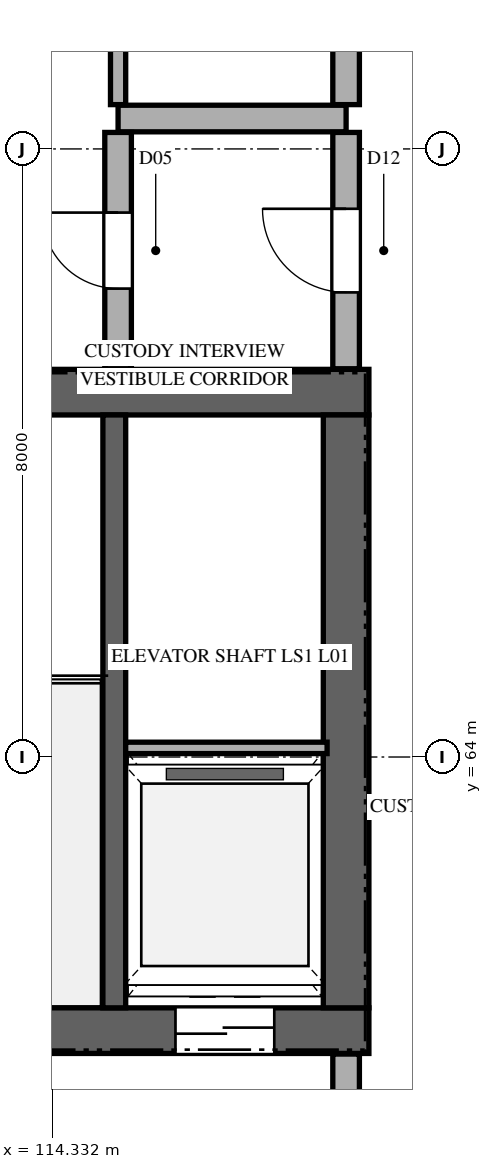
"""IFC4 building model, lengths in metres.
Left out: names, types, materials, properties, quantities, classifications, styles, units other than length and angle.
Written with IfcOpenShell. Run it as: python <this file> out.ifc"""

import sys

from ifc_helpers import new_model, si_unit, direction, frame, frame_2d, origin, place, context, subcontext, project, spatial, rectangle, extrude, element, fill, save


model = new_model("IFC4")
c1 = context("Model", 3, precision=1e-05, world=origin(), true_north=direction((0.0, 1.0)))
c2 = subcontext(c1, "Body", "Model", "MODEL_VIEW")
j1 = project(units=[si_unit("LENGTHUNIT", "METRE"), si_unit("PLANEANGLEUNIT", "RADIAN")], contexts=[c1])
p1 = place(None, origin())
s1 = spatial("IfcSite", under=j1, at=p1, CompositionType="ELEMENT")
p2 = place(p1, origin())
s2 = spatial("IfcBuilding", under=s1, at=p2, CompositionType="ELEMENT")
p3 = place(p2, frame((0.0, 0.0, 5.4)))
s3 = spatial("IfcBuildingStorey", under=s2, at=p3, CompositionType="ELEMENT", Elevation=5.4)
p4 = place(p3, frame((105.48, 60.4, 0.0), z_axis=(0.0, 0.0, 1.0), x_axis=(1.0, 0.0, 0.0)))
e1 = element("IfcWall", 1, at=p4, inside=s3, PredefinedType="SHEAR", context=c2, shape_type="SweptSolid", body=[
    extrude(rectangle(XDim=13.02, YDim=0.6, at=frame_2d((6.51, 0.0))), origin(), (0.0, 0.0, 1.0), 4.8),
])
p5 = place(p4, frame((1.27, 0.0, 0.0)))
e2 = element("IfcOpeningElement", 2, at=p5, cuts=e1, PredefinedType="OPENING", context=c2, shape_type="SweptSolid", body=[
    extrude(rectangle(XDim=1.15, YDim=2.25, at=frame_2d((0.575, 1.125))), frame((0.0, 0.31, 0.0), z_axis=(0.0, -1.0, 0.0), x_axis=(1.0, 0.0, 0.0)), (0.0, 0.0, 1.0), 0.62),
])
p6 = place(p4, frame((10.475, 0.0, 0.0)))
e3 = element("IfcOpeningElement", 3, at=p6, cuts=e1, PredefinedType="OPENING", context=c2, shape_type="SweptSolid", body=[
    extrude(rectangle(XDim=1.3, YDim=2.3, at=frame_2d((0.65, 1.15))), frame((0.0, 0.31, 0.0), z_axis=(0.0, -1.0, 0.0), x_axis=(1.0, 0.0, 0.0)), (0.0, 0.0, 1.0), 0.62),
])
p7 = place(p3, frame((105.48, 68.8, 0.0), z_axis=(0.0, 0.0, 1.0), x_axis=(1.0, 0.0, 0.0)))
e4 = element("IfcWall", 4, at=p7, inside=s3, PredefinedType="SHEAR", context=c2, shape_type="SweptSolid", body=[
    extrude(rectangle(XDim=13.02, YDim=0.6, at=frame_2d((6.51, 0.0))), origin(), (0.0, 0.0, 1.0), 4.8),
])
p8 = place(p3, frame((118.2, 60.7, 0.0), z_axis=(0.0, 0.0, 1.0), x_axis=(0.0, 1.0, 0.0)))
e5 = element("IfcWall", 5, at=p8, inside=s3, PredefinedType="SHEAR", context=c2, shape_type="SweptSolid", body=[
    extrude(rectangle(XDim=7.8, YDim=0.6, at=frame_2d((3.9, 0.0))), origin(), (0.0, 0.0, 1.0), 4.8),
])
p9 = place(p3, frame((115.15, 60.7, 0.0), z_axis=(0.0, 0.0, 1.0), x_axis=(0.0, 1.0, 0.0)))
e6 = element("IfcWall", 6, at=p9, inside=s3, PredefinedType="SHEAR", context=c2, shape_type="SweptSolid", body=[
    extrude(rectangle(XDim=7.8, YDim=0.3, at=frame_2d((3.9, 0.0))), origin(), (0.0, 0.0, 1.0), 4.8),
])
p10 = place(p3, frame((115.3, 64.12, 0.0), z_axis=(0.0, 0.0, 1.0), x_axis=(1.0, 0.0, 0.0)))
e7 = element("IfcWall", 7, at=p10, inside=s3, PredefinedType="PARTITIONING", context=c2, shape_type="SweptSolid", body=[
    extrude(rectangle(XDim=2.65, YDim=0.15, at=frame_2d((1.325, 0.0))), origin(), (0.0, 0.0, 1.0), 4.52),
])
p11 = place(p3, frame((115.2, 72.4, 0.0), z_axis=(0.0, 0.0, 1.0), x_axis=(1.0, 0.0, 0.0)))
e8 = element("IfcWall", 8, at=p11, inside=s3, PredefinedType="SOLIDWALL", context=c2, shape_type="SweptSolid", body=[
    extrude(rectangle(XDim=3.0, YDim=0.35, at=frame_2d((1.5, 0.0))), origin(), (0.0, 0.0, 1.0), 3.312),
])
p12 = place(p3, frame((115.2, 69.108, 0.0), z_axis=(0.0, 0.0, 1.0), x_axis=(0.0, 1.0, 0.0)))
e9 = element("IfcWall", 9, at=p12, inside=s3, PredefinedType="SOLIDWALL", context=c2, shape_type="SweptSolid", body=[
    extrude(rectangle(XDim=3.109, YDim=0.35, at=frame_2d((1.555, 0.0))), origin(), (0.0, 0.0, 1.0), 4.52),
])
p13 = place(p12, frame((1.054, 0.0, 0.0)))
e10 = element("IfcOpeningElement", 10, at=p13, cuts=e9, PredefinedType="OPENING", context=c2, shape_type="SweptSolid", body=[
    extrude(rectangle(XDim=1.0, YDim=2.2, at=frame_2d((0.5, 1.1))), frame((0.0, 0.185, 0.0), z_axis=(0.0, -1.0, 0.0), x_axis=(1.0, 0.0, 0.0)), (0.0, 0.0, 1.0), 0.37),
])
p14 = place(p3, frame((115.2, 72.583, 0.0), z_axis=(0.0, 0.0, 1.0), x_axis=(0.0, 1.0, 0.0)))
e11 = element("IfcWall", 11, at=p14, inside=s3, PredefinedType="PARTITIONING", context=c2, shape_type="SweptSolid", body=[
    extrude(rectangle(XDim=7.407, YDim=0.2, at=frame_2d((3.704, 0.0))), origin(), (0.0, 0.0, 1.0), 4.52),
])
p15 = place(p3, frame((118.2, 56.183, 0.0), z_axis=(0.0, 0.0, 1.0), x_axis=(0.0, 1.0, 0.0)))
e12 = element("IfcWall", 12, at=p15, inside=s3, PredefinedType="SOLIDWALL", context=c2, shape_type="SweptSolid", body=[
    extrude(rectangle(XDim=3.909, YDim=0.35, at=frame_2d((1.955, 0.0))), origin(), (0.0, 0.0, 1.0), 4.52),
])
p16 = place(p15, frame((1.354, 0.0, 0.0)))
e13 = element("IfcOpeningElement", 13, at=p16, cuts=e12, PredefinedType="OPENING", context=c2, shape_type="SweptSolid", body=[
    extrude(rectangle(XDim=1.2, YDim=2.2, at=frame_2d((0.6, 1.1))), frame((0.0, 0.185, 0.0), z_axis=(0.0, -1.0, 0.0), x_axis=(1.0, 0.0, 0.0)), (0.0, 0.0, 1.0), 0.37),
])
p17 = place(p3, frame((118.2, 69.108, 0.0), z_axis=(0.0, 0.0, 1.0), x_axis=(0.0, 1.0, 0.0)))
e14 = element("IfcWall", 14, at=p17, inside=s3, PredefinedType="SOLIDWALL", context=c2, shape_type="SweptSolid", body=[
    extrude(rectangle(XDim=3.109, YDim=0.35, at=frame_2d((1.555, 0.0))), origin(), (0.0, 0.0, 1.0), 4.52),
])
p18 = place(p17, frame((1.004, 0.0, 0.0)))
e15 = element("IfcOpeningElement", 15, at=p18, cuts=e14, PredefinedType="OPENING", context=c2, shape_type="SweptSolid", body=[
    extrude(rectangle(XDim=1.1, YDim=2.25, at=frame_2d((0.55, 1.125))), frame((0.0, 0.185, 0.0), z_axis=(0.0, -1.0, 0.0), x_axis=(1.0, 0.0, 0.0)), (0.0, 0.0, 1.0), 0.37),
])
p19 = place(p3, frame((118.2, 72.583, 0.0), z_axis=(0.0, 0.0, 1.0), x_axis=(0.0, 1.0, 0.0)))
e16 = element("IfcWall", 16, at=p19, inside=s3, PredefinedType="SOLIDWALL", context=c2, shape_type="SweptSolid", body=[
    extrude(rectangle(XDim=7.407, YDim=0.35, at=frame_2d((3.704, 0.0))), origin(), (0.0, 0.0, 1.0), 4.52),
])
p20 = place(p19, frame((3.204, 0.0, 0.0)))
e17 = element("IfcOpeningElement", 17, at=p20, cuts=e16, PredefinedType="OPENING", context=c2, shape_type="SweptSolid", body=[
    extrude(rectangle(XDim=1.0, YDim=2.2, at=frame_2d((0.5, 1.1))), frame((0.0, 0.185, 0.0), z_axis=(0.0, -1.0, 0.0), x_axis=(1.0, 0.0, 0.0)), (0.0, 0.0, 1.0), 0.37),
])
p21 = place(p6, frame((1.3, 0.0, 0.0), z_axis=(0.0, 0.0, 1.0), x_axis=(-1.0, 0.0, 0.0)))
e18 = element("IfcDoor", 18, at=p21, inside=s3, OperationType="DOUBLE_DOOR_SLIDING", PredefinedType="DOOR", context=c2, shape_type="SweptSolid", body=[
    extrude(rectangle(XDim=1.3, YDim=2.3, at=frame_2d((0.65, 1.15))), frame((0.0, 0.025, 0.0), z_axis=(0.0, -1.0, 0.0), x_axis=(1.0, 0.0, 0.0)), (0.0, 0.0, 1.0), 0.05),
])
fill(e3, e18)
p22 = place(p13, origin())
e19 = element("IfcDoor", 19, at=p22, inside=s3, OperationType="SINGLE_SWING_RIGHT", PredefinedType="DOOR", context=c2, shape_type="SweptSolid", body=[
    extrude(rectangle(XDim=1.0, YDim=2.2, at=frame_2d((0.5, 1.1))), frame((0.0, 0.025, 0.0), z_axis=(0.0, -1.0, 0.0), x_axis=(1.0, 0.0, 0.0)), (0.0, 0.0, 1.0), 0.05),
])
fill(e10, e19)
p23 = place(p18, origin())
e20 = element("IfcDoor", 20, at=p23, inside=s3, OperationType="SINGLE_SWING_RIGHT", PredefinedType="DOOR", context=c2, shape_type="SweptSolid", body=[
    extrude(rectangle(XDim=1.1, YDim=2.25, at=frame_2d((0.55, 1.125))), frame((0.0, 0.025, 0.0), z_axis=(0.0, -1.0, 0.0), x_axis=(1.0, 0.0, 0.0)), (0.0, 0.0, 1.0), 0.05),
])
fill(e15, e20)
save(model, sys.argv[1])
